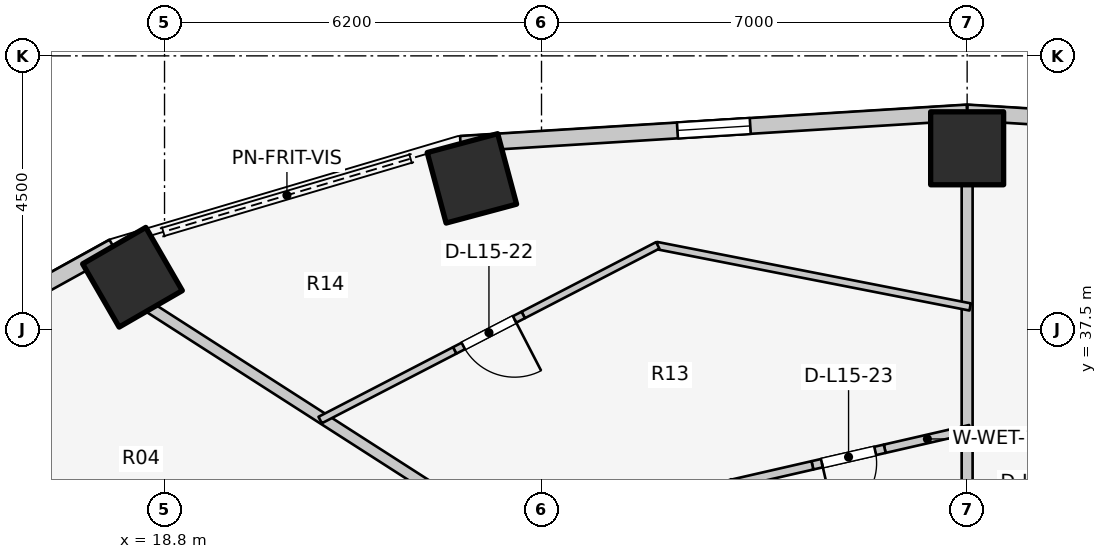
"""IFC4 building model, lengths in metres.
Left out: names, types, materials, properties, quantities, classifications, styles, units other than length and angle.
Written with IfcOpenShell. Run it as: python <this file> out.ifc"""

import sys

from ifc_helpers import new_model, si_unit, direction, frame, frame_2d, origin, origin_2d, place, context, subcontext, project, spatial, rectangle, extrude, element, fill, save


model = new_model("IFC4")
c1 = context("Model", 3, precision=1e-05, world=origin(), true_north=direction((0.0, 1.0)))
c2 = subcontext(c1, "Body", "Model", "MODEL_VIEW")
j1 = project(units=[si_unit("LENGTHUNIT", "METRE"), si_unit("PLANEANGLEUNIT", "RADIAN")], contexts=[c1])
p1 = place(None, origin())
s1 = spatial("IfcSite", under=j1, at=p1, CompositionType="ELEMENT")
p2 = place(p1, origin())
s2 = spatial("IfcBuilding", under=s1, at=p2, CompositionType="ELEMENT")
p3 = place(p2, frame((0.0, 0.0, 52.4)))
s3 = spatial("IfcBuildingStorey", under=s2, at=p3, CompositionType="ELEMENT", Elevation=52.4)
for number, where, z_axis, x_axis in (
    (1, (32.0, 40.48, 0.0), (0.0, 0.0, 1.0), (0.0, 1.0, 0.0)),
    (2, (23.855, 39.986, 0.0), (0.0, 0.0, 1.0), (-0.259, 0.966, 0.0)),
    (3, (18.273, 38.359, 0.0), (0.0, 0.0, 1.0), (-0.5, 0.866, 0.0)),
):
    element("IfcColumn", number, at=place(p3, frame(where, z_axis=z_axis, x_axis=x_axis)), inside=s3, PredefinedType="COLUMN", context=c2, shape_type="SweptSolid", body=[
        extrude(rectangle(XDim=1.2, YDim=1.2, at=origin_2d()), origin(), (0.0, 0.0, 1.0), 3.1),
    ])
p4 = place(p3, frame((40.332, 40.553, 0.0), z_axis=(0.0, 0.0, 1.0), x_axis=(-0.998090514779, 0.061768311519, 0.0)))
e4 = element("IfcWall", 4, at=p4, inside=s3, PredefinedType="STANDARD", context=c2, shape_type="SweptSolid", body=[
    extrude(rectangle(XDim=8.348, YDim=0.26, at=frame_2d((4.174, 0.0))), origin(), (0.0, 0.0, 1.0), 1.22),
])
p5 = place(p4, frame((3.574, 0.0, 0.15)))
e5 = element("IfcOpeningElement", 5, at=p5, cuts=e4, PredefinedType="OPENING", context=c2, shape_type="SweptSolid", body=[
    extrude(rectangle(XDim=1.2, YDim=0.9, at=frame_2d((0.6, 0.45))), frame((0.0, 0.14, 0.0), z_axis=(0.0, -1.0, 0.0), x_axis=(1.0, 0.0, 0.0)), (0.0, 0.0, 1.0), 0.28),
])
p6 = place(p3, frame((32.0, 41.069, 0.0), z_axis=(0.0, 0.0, 1.0), x_axis=(-0.998090514779, -0.061768311519, 0.0)))
e6 = element("IfcWall", 6, at=p6, inside=s3, PredefinedType="STANDARD", context=c2, shape_type="SweptSolid", body=[
    extrude(rectangle(XDim=8.348, YDim=0.26, at=frame_2d((4.174, 0.0))), origin(), (0.0, 0.0, 1.0), 1.22),
])
p7 = place(p6, frame((3.574, 0.0, 0.15)))
e7 = element("IfcOpeningElement", 7, at=p7, cuts=e6, PredefinedType="OPENING", context=c2, shape_type="SweptSolid", body=[
    extrude(rectangle(XDim=1.2, YDim=0.9, at=frame_2d((0.6, 0.45))), frame((0.0, 0.14, 0.0), z_axis=(0.0, -1.0, 0.0), x_axis=(1.0, 0.0, 0.0)), (0.0, 0.0, 1.0), 0.28),
])
p8 = place(p3, frame((17.958, 38.862, 0.0), z_axis=(0.0, 0.0, 1.0), x_axis=(-0.875137303239, -0.483874674352, 0.0)))
e8 = element("IfcWall", 8, at=p8, inside=s3, PredefinedType="STANDARD", context=c2, shape_type="SweptSolid", body=[
    extrude(rectangle(XDim=4.985, YDim=0.26, at=frame_2d((2.493, 0.0))), origin(), (0.0, 0.0, 1.0), 1.22),
])
p9 = place(p3, frame((32.0, 33.905, 0.0), z_axis=(0.0, 0.0, 1.0), x_axis=(0.0, 1.0, 0.0)))
e9 = element("IfcWall", 9, at=p9, inside=s3, PredefinedType="PARTITIONING", context=c2, shape_type="SweptSolid", body=[
    extrude(rectangle(XDim=5.995, YDim=0.18, at=frame_2d((2.998, 0.0))), origin(), (0.0, 0.0, 1.0), 1.957),
])
p10 = place(p3, frame((27.029, 32.426, 0.0), z_axis=(0.0, 0.0, 1.0), x_axis=(-0.841689919529, 0.5399611832, 0.0)))
e10 = element("IfcWall", 10, at=p10, inside=s3, PredefinedType="PARTITIONING", context=c2, shape_type="SweptSolid", body=[
    extrude(rectangle(XDim=10.058, YDim=0.18, at=frame_2d((5.029, 0.0))), origin(), (0.0, 0.0, 1.0), 1.957),
])
p11 = place(p3, frame((32.049, 37.871, 0.0), z_axis=(0.0, 0.0, 1.0), x_axis=(-0.981343325718, 0.192263561471, 0.0)))
e11 = element("IfcWall", 11, at=p11, inside=s3, PredefinedType="MOVABLE", context=c2, shape_type="SweptSolid", body=[
    extrude(rectangle(XDim=5.255, YDim=0.12, at=frame_2d((2.627, 0.0))), origin(), (0.0, 0.0, 1.0), 1.957),
])
p12 = place(p3, frame((26.911, 38.884, 0.0), z_axis=(0.0, 0.0, 1.0), x_axis=(-0.888145903538, -0.459561588939, 0.0)))
e12 = element("IfcWall", 12, at=p12, inside=s3, PredefinedType="MOVABLE", context=c2, shape_type="SweptSolid", body=[
    extrude(rectangle(XDim=2.49, YDim=0.12, at=frame_2d((1.245, 0.0))), origin(), (0.0, 0.0, 1.0), 1.957),
])
p13 = place(p3, frame((24.699, 37.74, 0.0), z_axis=(0.0, 0.0, 1.0), x_axis=(-0.888190589687, -0.459475218474, 0.0)))
e13 = element("IfcWall", 13, at=p13, inside=s3, PredefinedType="MOVABLE", context=c2, shape_type="SweptSolid", body=[
    extrude(rectangle(XDim=1.27, YDim=0.12, at=frame_2d((0.635, 0.0))), origin(), (0.0, 0.0, 1.0), 2.575),
])
p14 = place(p13, frame((0.16, 0.0, 0.0)))
e14 = element("IfcOpeningElement", 14, at=p14, cuts=e13, PredefinedType="OPENING", context=c2, shape_type="SweptSolid", body=[
    extrude(rectangle(XDim=0.95, YDim=2.1, at=frame_2d((0.475, 1.05))), frame((0.0, 0.07, 0.0), z_axis=(0.0, -1.0, 0.0), x_axis=(1.0, 0.0, 0.0)), (0.0, 0.0, 1.0), 0.14),
])
p15 = place(p3, frame((23.572, 37.156, 0.0), z_axis=(0.0, 0.0, 1.0), x_axis=(-0.888145903538, -0.459561588939, 0.0)))
e15 = element("IfcWall", 15, at=p15, inside=s3, PredefinedType="MOVABLE", context=c2, shape_type="SweptSolid", body=[
    extrude(rectangle(XDim=2.49, YDim=0.12, at=frame_2d((1.245, 0.0))), origin(), (0.0, 0.0, 1.0), 1.957),
])
p16 = place(p3, frame((29.484, 33.443, 0.0), z_axis=(0.0, 0.0, 1.0), x_axis=(-0.675445566455, 0.737409849918, 0.0)))
e16 = element("IfcWall", 16, at=p16, inside=s3, PredefinedType="PLUMBINGWALL", context=c2, shape_type="SweptSolid", body=[
    extrude(rectangle(XDim=2.1, YDim=0.14, at=frame_2d((1.05, 0.0))), origin(), (0.0, 0.0, 1.0), 2.575),
])
p17 = place(p3, frame((32.049, 35.861, 0.0), z_axis=(0.0, 0.0, 1.0), x_axis=(-0.974701562934, -0.223510320151, 0.0)))
e17 = element("IfcWall", 17, at=p17, inside=s3, PredefinedType="PLUMBINGWALL", context=c2, shape_type="SweptSolid", body=[
    extrude(rectangle(XDim=1.441, YDim=0.14, at=frame_2d((0.72, 0.0))), origin(), (0.0, 0.0, 1.0), 1.957),
])
p18 = place(p3, frame((30.644, 35.539, 0.0), z_axis=(0.0, 0.0, 1.0), x_axis=(-0.97464691241, -0.223748510898, 0.0)))
e18 = element("IfcWall", 18, at=p18, inside=s3, PredefinedType="PLUMBINGWALL", context=c2, shape_type="SweptSolid", body=[
    extrude(rectangle(XDim=1.22, YDim=0.14, at=frame_2d((0.61, 0.0))), origin(), (0.0, 0.0, 1.0), 2.575),
])
p19 = place(p18, frame((0.16, 0.0, 0.0)))
e19 = element("IfcOpeningElement", 19, at=p19, cuts=e18, PredefinedType="OPENING", context=c2, shape_type="SweptSolid", body=[
    extrude(rectangle(XDim=0.9, YDim=2.1, at=frame_2d((0.45, 1.05))), frame((0.0, 0.08, 0.0), z_axis=(0.0, -1.0, 0.0), x_axis=(1.0, 0.0, 0.0)), (0.0, 0.0, 1.0), 0.16),
])
p20 = place(p3, frame((29.455, 35.266, 0.0), z_axis=(0.0, 0.0, 1.0), x_axis=(-0.97466463441, -0.223671299969, 0.0)))
e20 = element("IfcWall", 20, at=p20, inside=s3, PredefinedType="PLUMBINGWALL", context=c2, shape_type="SweptSolid", body=[
    extrude(rectangle(XDim=1.441, YDim=0.14, at=frame_2d((0.72, 0.0))), origin(), (0.0, 0.0, 1.0), 2.575),
])
p21 = place(p7, origin())
e21 = element("IfcWindow", 21, at=p21, inside=s3, PartitioningType="SINGLE_PANEL", PredefinedType="WINDOW", context=c2, shape_type="SweptSolid", body=[
    extrude(rectangle(XDim=1.2, YDim=0.9, at=frame_2d((0.6, 0.45))), frame((0.0, 0.03, 0.0), z_axis=(0.0, -1.0, 0.0), x_axis=(1.0, 0.0, 0.0)), (0.0, 0.0, 1.0), 0.06),
])
fill(e7, e21)
p22 = place(p14, origin())
e22 = element("IfcDoor", 22, at=p22, inside=s3, OperationType="SINGLE_SWING_LEFT", PredefinedType="DOOR", context=c2, shape_type="SweptSolid", body=[
    extrude(rectangle(XDim=0.95, YDim=2.1, at=frame_2d((0.475, 1.05))), frame((0.0, 0.025, 0.0), z_axis=(0.0, -1.0, 0.0), x_axis=(1.0, 0.0, 0.0)), (0.0, 0.0, 1.0), 0.05),
])
fill(e14, e22)
p23 = place(p19, origin())
e23 = element("IfcDoor", 23, at=p23, inside=s3, OperationType="SINGLE_SWING_RIGHT", PredefinedType="DOOR", context=c2, shape_type="SweptSolid", body=[
    extrude(rectangle(XDim=0.9, YDim=2.1, at=frame_2d((0.45, 1.05))), frame((0.0, 0.025, 0.0), z_axis=(0.0, -1.0, 0.0), x_axis=(1.0, 0.0, 0.0)), (0.0, 0.0, 1.0), 0.05),
])
fill(e19, e23)
save(model, sys.argv[1])
